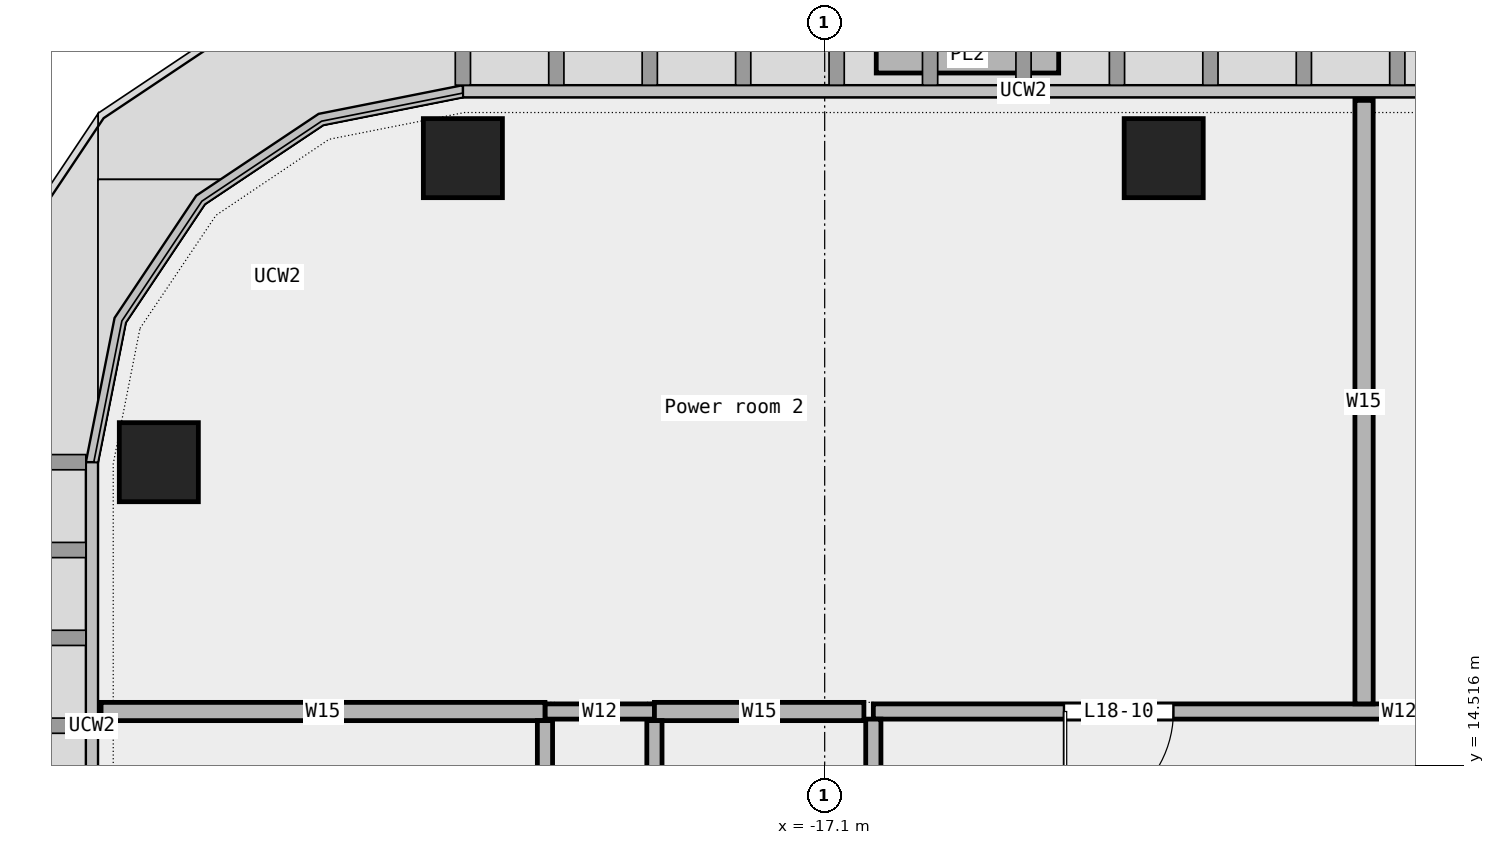
"""IFC4 building model, lengths in metres.
Left out: names, types, materials, properties, quantities, classifications, styles, units other than length and angle.
Written with IfcOpenShell. Run it as: python <this file> out.ifc"""

import sys

from ifc_helpers import new_model, si_unit, direction, frame, frame_2d, origin, origin_2d, place, context, subcontext, project, spatial, rectangle, extrude, element, fill, save


model = new_model("IFC4")
c1 = context("Model", 3, precision=1e-05, world=origin(), true_north=direction((0.0, 1.0)))
c2 = subcontext(c1, "Body", "Model", "MODEL_VIEW")
j1 = project(units=[si_unit("LENGTHUNIT", "METRE"), si_unit("PLANEANGLEUNIT", "RADIAN")], contexts=[c1])
p1 = place(None, origin())
s1 = spatial("IfcSite", under=j1, at=p1, CompositionType="ELEMENT")
p2 = place(p1, origin())
s2 = spatial("IfcBuilding", under=s1, at=p2, CompositionType="ELEMENT")
p3 = place(p2, frame((0.0, 0.0, 94.6)))
s3 = spatial("IfcBuildingStorey", under=s2, at=p3, CompositionType="ELEMENT", Elevation=94.6)
for number, where, z_axis, x_axis in (
    (1, (-11.525, 24.5, 0.0), (0.0, 0.0, 1.0), (1.0, 0.0, 0.0)),
    (2, (-23.05, 24.5, 0.0), (0.0, 0.0, 1.0), (1.0, 0.0, 0.0)),
    (3, (-28.05, 19.5, 0.0), (0.0, 0.0, 1.0), (1.0, 0.0, 0.0)),
):
    element("IfcColumn", number, at=place(p3, frame(where, z_axis=z_axis, x_axis=x_axis)), inside=s3, PredefinedType="COLUMN", context=c2, shape_type="SweptSolid", body=[
        extrude(rectangle(XDim=1.3, YDim=1.3, at=origin_2d()), origin(), (0.0, 0.0, 1.0), 4.05),
    ])
p4 = place(p3, frame((-13.252, 26.2, 0.0), z_axis=(0.0, 0.0, 1.0), x_axis=(-1.0, 0.0, 0.0)))
e4 = element("IfcWall", 4, at=p4, inside=s3, PredefinedType="STANDARD", context=c2, shape_type="SweptSolid", body=[
    extrude(rectangle(XDim=3.0, YDim=0.6, at=frame_2d((1.5, 0.0))), origin(), (0.0, 0.0, 1.0), 0.7),
])
p5 = place(p3, frame((-21.7, 15.4, 0.0), z_axis=(0.0, 0.0, 1.0), x_axis=(1.0, 0.0, 0.0)))
e5 = element("IfcWall", 5, at=p5, inside=s3, PredefinedType="PARTITIONING", context=c2, shape_type="SweptSolid", body=[
    extrude(rectangle(XDim=1.8, YDim=0.25, at=frame_2d((0.9, 0.0))), origin(), (0.0, 0.0, 1.0), 4.05),
])
p6 = place(p3, frame((-16.3, 15.4, 0.0), z_axis=(0.0, 0.0, 1.0), x_axis=(1.0, 0.0, 0.0)))
e6 = element("IfcWall", 6, at=p6, inside=s3, PredefinedType="PARTITIONING", context=c2, shape_type="SweptSolid", body=[
    extrude(rectangle(XDim=17.3, YDim=0.25, at=frame_2d((8.65, 0.0))), origin(), (0.0, 0.0, 1.0), 4.05),
])
p7 = place(p6, frame((12.085, 0.0, 0.0)))
e7 = element("IfcOpeningElement", 7, at=p7, cuts=e6, PredefinedType="OPENING", context=c2, shape_type="SweptSolid", body=[
    extrude(rectangle(XDim=1.2, YDim=2.1, at=frame_2d((0.6, 1.05))), frame((0.0, 0.137, 0.0), z_axis=(0.0, -1.0, 0.0), x_axis=(1.0, 0.0, 0.0)), (0.0, 0.0, 1.0), 0.274),
])
p8 = place(p6, frame((3.135, 0.0, 0.0)))
e8 = element("IfcOpeningElement", 8, at=p8, cuts=e6, PredefinedType="OPENING", context=c2, shape_type="SweptSolid", body=[
    extrude(rectangle(XDim=1.8, YDim=2.1, at=frame_2d((0.9, 1.05))), frame((0.0, 0.137, 0.0), z_axis=(0.0, -1.0, 0.0), x_axis=(1.0, 0.0, 0.0)), (0.0, 0.0, 1.0), 0.274),
])
p9 = place(p3, frame((-29.0, 15.4, 0.0), z_axis=(0.0, 0.0, 1.0), x_axis=(1.0, 0.0, 0.0)))
e9 = element("IfcWall", 9, at=p9, inside=s3, PredefinedType="PARTITIONING", context=c2, shape_type="SweptSolid", body=[
    extrude(rectangle(XDim=7.3, YDim=0.3, at=frame_2d((3.65, 0.0))), origin(), (0.0, 0.0, 1.0), 4.05),
])
p10 = place(p3, frame((-19.9, 15.4, 0.0), z_axis=(0.0, 0.0, 1.0), x_axis=(1.0, 0.0, 0.0)))
e10 = element("IfcWall", 10, at=p10, inside=s3, PredefinedType="PARTITIONING", context=c2, shape_type="SweptSolid", body=[
    extrude(rectangle(XDim=3.445, YDim=0.3, at=frame_2d((1.722, 0.0))), origin(), (0.0, 0.0, 1.0), 4.05),
])
p11 = place(p3, frame((-21.7, 10.96, 0.0), z_axis=(0.0, 0.0, 1.0), x_axis=(0.0, 1.0, 0.0)))
e11 = element("IfcWall", 11, at=p11, inside=s3, PredefinedType="PARTITIONING", context=c2, shape_type="SweptSolid", body=[
    extrude(rectangle(XDim=4.29, YDim=0.25, at=frame_2d((2.145, 0.0))), origin(), (0.0, 0.0, 1.0), 4.05),
])
p12 = place(p11, frame((1.545, 0.0, 0.0)))
e12 = element("IfcOpeningElement", 12, at=p12, cuts=e11, PredefinedType="OPENING", context=c2, shape_type="SweptSolid", body=[
    extrude(rectangle(XDim=1.2, YDim=2.1, at=frame_2d((0.6, 1.05))), frame((0.0, 0.137, 0.0), z_axis=(0.0, -1.0, 0.0), x_axis=(1.0, 0.0, 0.0)), (0.0, 0.0, 1.0), 0.274),
])
p13 = place(p3, frame((-19.9, 9.21, 0.0), z_axis=(0.0, 0.0, 1.0), x_axis=(0.0, 1.0, 0.0)))
e13 = element("IfcWall", 13, at=p13, inside=s3, PredefinedType="PARTITIONING", context=c2, shape_type="SweptSolid", body=[
    extrude(rectangle(XDim=6.04, YDim=0.25, at=frame_2d((3.02, 0.0))), origin(), (0.0, 0.0, 1.0), 4.05),
])
p14 = place(p3, frame((-16.3, 11.75, 0.0), z_axis=(0.0, 0.0, 1.0), x_axis=(0.0, 1.0, 0.0)))
e14 = element("IfcWall", 14, at=p14, inside=s3, PredefinedType="PARTITIONING", context=c2, shape_type="SweptSolid", body=[
    extrude(rectangle(XDim=3.525, YDim=0.25, at=frame_2d((1.762, 0.0))), origin(), (0.0, 0.0, 1.0), 4.05),
])
p15 = place(p14, frame((1.312, 0.0, 0.0)))
e15 = element("IfcOpeningElement", 15, at=p15, cuts=e14, PredefinedType="OPENING", context=c2, shape_type="SweptSolid", body=[
    extrude(rectangle(XDim=0.9, YDim=2.1, at=frame_2d((0.45, 1.05))), frame((0.0, 0.137, 0.0), z_axis=(0.0, -1.0, 0.0), x_axis=(1.0, 0.0, 0.0)), (0.0, 0.0, 1.0), 0.274),
])
p16 = place(p3, frame((-8.23, 15.525, 0.0), z_axis=(0.0, 0.0, 1.0), x_axis=(0.0, 1.0, 0.0)))
e16 = element("IfcWall", 16, at=p16, inside=s3, PredefinedType="PARTITIONING", context=c2, shape_type="SweptSolid", body=[
    extrude(rectangle(XDim=9.925, YDim=0.3, at=frame_2d((4.962, 0.0))), origin(), (0.0, 0.0, 1.0), 4.05),
])
p17 = place(p8, origin())
e17 = element("IfcDoor", 17, at=p17, inside=s3, OperationType="DOUBLE_DOOR_SINGLE_SWING", PredefinedType="DOOR", context=c2, shape_type="SweptSolid", body=[
    extrude(rectangle(XDim=1.8, YDim=2.1, at=frame_2d((0.9, 1.05))), frame((0.0, 0.025, 0.0), z_axis=(0.0, -1.0, 0.0), x_axis=(1.0, 0.0, 0.0)), (0.0, 0.0, 1.0), 0.05),
])
fill(e8, e17)
save(model, sys.argv[1])
